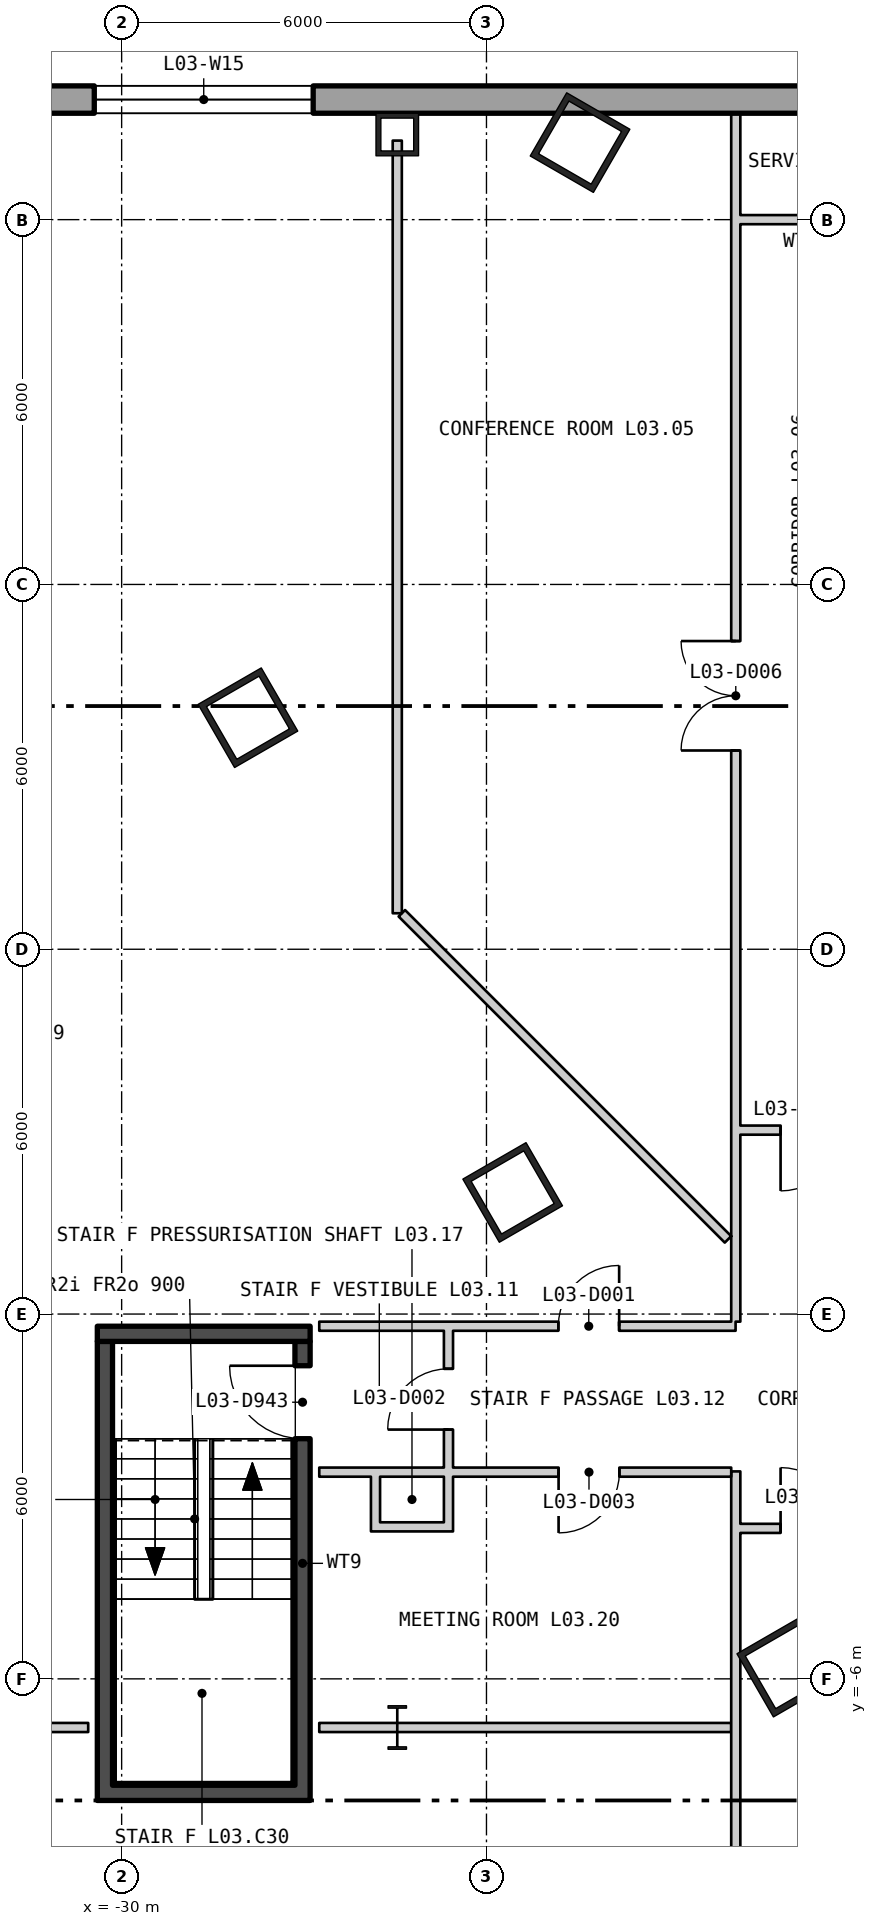
"""IFC4 building model, lengths in metres.
Left out: names, types, materials, properties, quantities, classifications, styles, units other than length and angle.
Written with IfcOpenShell. Run it as: python <this file> out.ifc"""

import sys

from ifc_helpers import new_model, si_unit, direction, frame, frame_2d, origin, origin_2d, place, context, subcontext, project, spatial, polyline, rectangle, hollow_rectangle, i_section, outline, extrude, element, fill, save


model = new_model("IFC4")
c1 = context("Model", 3, precision=1e-05, world=origin(), true_north=direction((0.0, 1.0)))
c2 = subcontext(c1, "Body", "Model", "MODEL_VIEW")
j1 = project(units=[si_unit("LENGTHUNIT", "METRE"), si_unit("PLANEANGLEUNIT", "RADIAN")], contexts=[c1])
p1 = place(None, origin())
s1 = spatial("IfcSite", under=j1, at=p1, CompositionType="ELEMENT")
p2 = place(p1, origin())
s2 = spatial("IfcBuilding", under=s1, at=p2, CompositionType="ELEMENT")
p3 = place(p2, frame((0.0, 0.0, 18.6)))
s3 = spatial("IfcBuildingStorey", under=s2, at=p3, CompositionType="ELEMENT", Elevation=18.6)
for number, where, z_axis, x_axis in (
    (1, (-22.461, 19.267, 0.0), (0.0, 0.0, 1.0), (-0.5, -0.866, 0.0)),
    (2, (-27.923, 9.808, 0.0), (0.0, 0.0, 1.0), (0.5, -0.866, 0.0)),
    (3, (-23.569, 2.0, 0.0), (0.0, 0.0, 1.0), (0.5, -0.866, 0.0)),
    (4, (-19.061, -5.807, 0.0), (0.0, 0.0, 1.0), (0.5, -0.866, 0.0)),
):
    element("IfcColumn", number, at=place(p3, frame(where, z_axis=z_axis, x_axis=x_axis)), inside=s3, PredefinedType="COLUMN", context=c2, shape_type="SweptSolid", body=[
        extrude(hollow_rectangle(XDim=1.2, YDim=1.2, WallThickness=0.1, at=origin_2d()), origin(), (0.0, 0.0, 1.0), 5.1),
    ])
p4 = place(p3, frame((-25.467, 19.4, 0.0), z_axis=(0.0, 0.0, 1.0), x_axis=(-1.0, 0.0, 0.0)))
e5 = element("IfcColumn", 5, at=p4, inside=s3, PredefinedType="COLUMN", context=c2, shape_type="SweptSolid", body=[
    extrude(hollow_rectangle(XDim=0.7, YDim=0.7, WallThickness=0.08, at=origin_2d()), origin(), (0.0, 0.0, 1.0), 5.1),
])
p5 = place(p3, frame((-25.467, -6.8, 0.0), z_axis=(0.0, 0.0, 1.0), x_axis=(1.0, 0.0, 0.0)))
e6 = element("IfcColumn", 6, at=p5, inside=s3, PredefinedType="COLUMN", context=c2, shape_type="SweptSolid", body=[
    extrude(i_section(OverallWidth=0.304, OverallDepth=0.716, WebThickness=0.021, FlangeThickness=0.04, at=origin_2d()), origin(), (0.0, 0.0, 1.0), 5.1),
])
p6 = place(p3, frame((38.775, 19.975, -0.4), z_axis=(0.0, 0.0, 1.0), x_axis=(-1.0, 0.0, 0.0)))
e7 = element("IfcWall", 7, at=p6, inside=s3, PredefinedType="SOLIDWALL", context=c2, shape_type="SweptSolid", body=[
    extrude(outline(polyline([(-0.225, -0.225), (77.775, -0.225), (77.325, 0.225), (0.225, 0.225), (-0.225, -0.225)])), origin(), (0.0, 0.0, 1.0), 5.1),
])
p7 = place(p6, frame((1.958, 0.0, 1.3)))
e8 = element("IfcOpeningElement", 8, at=p7, cuts=e7, PredefinedType="OPENING", context=c2, shape_type="SweptSolid", body=[
    extrude(rectangle(XDim=3.6, YDim=3.2, at=frame_2d((1.8, 1.6))), frame((0.0, 0.235, 0.0), z_axis=(0.0, -1.0, 0.0), x_axis=(1.0, 0.0, 0.0)), (0.0, 0.0, 1.0), 0.47),
])
p8 = place(p6, frame((8.325, 0.0, 1.3)))
e9 = element("IfcOpeningElement", 9, at=p8, cuts=e7, PredefinedType="OPENING", context=c2, shape_type="SweptSolid", body=[
    extrude(rectangle(XDim=3.6, YDim=3.2, at=frame_2d((1.8, 1.6))), frame((0.0, 0.235, 0.0), z_axis=(0.0, -1.0, 0.0), x_axis=(1.0, 0.0, 0.0)), (0.0, 0.0, 1.0), 0.47),
])
p9 = place(p6, frame((20.952, 0.0, 1.3)))
e10 = element("IfcOpeningElement", 10, at=p9, cuts=e7, PredefinedType="OPENING", context=c2, shape_type="SweptSolid", body=[
    extrude(rectangle(XDim=3.6, YDim=3.2, at=frame_2d((1.8, 1.6))), frame((0.0, 0.235, 0.0), z_axis=(0.0, -1.0, 0.0), x_axis=(1.0, 0.0, 0.0)), (0.0, 0.0, 1.0), 0.47),
])
p10 = place(p6, frame((27.425, 0.0, 1.3)))
e11 = element("IfcOpeningElement", 11, at=p10, cuts=e7, PredefinedType="OPENING", context=c2, shape_type="SweptSolid", body=[
    extrude(rectangle(XDim=3.6, YDim=3.2, at=frame_2d((1.8, 1.6))), frame((0.0, 0.235, 0.0), z_axis=(0.0, -1.0, 0.0), x_axis=(1.0, 0.0, 0.0)), (0.0, 0.0, 1.0), 0.47),
])
p11 = place(p6, frame((46.525, 0.0, 1.3)))
e12 = element("IfcOpeningElement", 12, at=p11, cuts=e7, PredefinedType="OPENING", context=c2, shape_type="SweptSolid", body=[
    extrude(rectangle(XDim=3.6, YDim=3.2, at=frame_2d((1.8, 1.6))), frame((0.0, 0.235, 0.0), z_axis=(0.0, -1.0, 0.0), x_axis=(1.0, 0.0, 0.0)), (0.0, 0.0, 1.0), 0.47),
])
p12 = place(p6, frame((52.998, 0.0, 1.3)))
e13 = element("IfcOpeningElement", 13, at=p12, cuts=e7, PredefinedType="OPENING", context=c2, shape_type="SweptSolid", body=[
    extrude(rectangle(XDim=3.6, YDim=3.2, at=frame_2d((1.8, 1.6))), frame((0.0, 0.235, 0.0), z_axis=(0.0, -1.0, 0.0), x_axis=(1.0, 0.0, 0.0)), (0.0, 0.0, 1.0), 0.47),
])
p13 = place(p6, frame((65.625, 0.0, 1.3)))
e14 = element("IfcOpeningElement", 14, at=p13, cuts=e7, PredefinedType="OPENING", context=c2, shape_type="SweptSolid", body=[
    extrude(rectangle(XDim=3.6, YDim=3.2, at=frame_2d((1.8, 1.6))), frame((0.0, 0.235, 0.0), z_axis=(0.0, -1.0, 0.0), x_axis=(1.0, 0.0, 0.0)), (0.0, 0.0, 1.0), 0.47),
])
p14 = place(p6, frame((71.992, 0.0, 1.3)))
e15 = element("IfcOpeningElement", 15, at=p14, cuts=e7, PredefinedType="OPENING", context=c2, shape_type="SweptSolid", body=[
    extrude(rectangle(XDim=3.6, YDim=3.2, at=frame_2d((1.8, 1.6))), frame((0.0, 0.235, 0.0), z_axis=(0.0, -1.0, 0.0), x_axis=(1.0, 0.0, 0.0)), (0.0, 0.0, 1.0), 0.47),
])
p15 = place(p3, frame((-30.275, -7.75, 0.0), z_axis=(0.0, 0.0, 1.0), x_axis=(0.0, 1.0, 0.0)))
e16 = element("IfcWall", 16, at=p15, inside=s3, PredefinedType="SHEAR", context=c2, shape_type="SweptSolid", body=[
    extrude(rectangle(XDim=7.3, YDim=0.25, at=frame_2d((3.65, 0.0))), origin(), (0.0, 0.0, 1.0), 4.88),
])
p16 = place(p3, frame((-27.025, -7.75, 0.0), z_axis=(0.0, 0.0, 1.0), x_axis=(0.0, 1.0, 0.0)))
e17 = element("IfcWall", 17, at=p16, inside=s3, PredefinedType="SHEAR", context=c2, shape_type="SweptSolid", body=[
    extrude(rectangle(XDim=7.3, YDim=0.25, at=frame_2d((3.65, 0.0))), origin(), (0.0, 0.0, 1.0), 4.88),
])
p17 = place(p16, frame((5.7, 0.0, 0.0)))
e18 = element("IfcOpeningElement", 18, at=p17, cuts=e17, PredefinedType="OPENING", context=c2, shape_type="SweptSolid", body=[
    extrude(rectangle(XDim=1.2, YDim=2.1, at=frame_2d((0.6, 1.05))), frame((0.0, 0.135, 0.0), z_axis=(0.0, -1.0, 0.0), x_axis=(1.0, 0.0, 0.0)), (0.0, 0.0, 1.0), 0.27),
])
for number, where, z_axis, x_axis in (
    (19, (-30.4, -7.875, 0.0), (0.0, 0.0, 1.0), (1.0, 0.0, 0.0)),
    (20, (-30.4, -0.325, 0.0), (0.0, 0.0, 1.0), (1.0, 0.0, 0.0)),
):
    element("IfcWall", number, at=place(p3, frame(where, z_axis=z_axis, x_axis=x_axis)), inside=s3, PredefinedType="SHEAR", context=c2, shape_type="SweptSolid", body=[
        extrude(rectangle(XDim=3.5, YDim=0.25, at=frame_2d((1.75, 0.0))), origin(), (0.0, 0.0, 1.0), 4.88),
    ])
p18 = place(p3, frame((-38.1, -6.8, 0.0), z_axis=(0.0, 0.0, 1.0), x_axis=(1.0, 0.0, 0.0)))
e21 = element("IfcWall", 21, at=p18, inside=s3, PredefinedType="PARTITIONING", context=c2, shape_type="SweptSolid", body=[
    extrude(rectangle(XDim=7.55, YDim=0.15, at=frame_2d((3.775, 0.0))), origin(), (0.0, 0.0, 1.0), 4.09),
])
p19 = place(p3, frame((-26.75, -6.8, 0.0), z_axis=(0.0, 0.0, 1.0), x_axis=(1.0, 0.0, 0.0)))
e22 = element("IfcWall", 22, at=p19, inside=s3, PredefinedType="PARTITIONING", context=c2, shape_type="SweptSolid", body=[
    extrude(rectangle(XDim=6.775, YDim=0.15, at=frame_2d((3.388, 0.0))), origin(), (0.0, 0.0, 1.0), 4.09),
])
p20 = place(p3, frame((-26.75, -2.6, 0.0), z_axis=(0.0, 0.0, 1.0), x_axis=(1.0, 0.0, 0.0)))
e23 = element("IfcWall", 23, at=p20, inside=s3, PredefinedType="PARTITIONING", context=c2, shape_type="SweptSolid", body=[
    extrude(rectangle(XDim=0.913, YDim=0.15, at=frame_2d((0.457, 0.0))), origin(), (0.0, 0.0, 1.0), 4.88),
])
p21 = place(p3, frame((-26.75, -0.2, 0.0), z_axis=(0.0, 0.0, 1.0), x_axis=(1.0, 0.0, 0.0)))
e24 = element("IfcWall", 24, at=p21, inside=s3, PredefinedType="PARTITIONING", context=c2, shape_type="SweptSolid", body=[
    extrude(rectangle(XDim=6.847, YDim=0.15, at=frame_2d((3.424, 0.0))), origin(), (0.0, 0.0, 1.0), 4.88),
])
p22 = place(p21, frame((3.932, 0.0, 0.0)))
e25 = element("IfcOpeningElement", 25, at=p22, cuts=e24, PredefinedType="OPENING", context=c2, shape_type="SweptSolid", body=[
    extrude(rectangle(XDim=1.0, YDim=2.1, at=frame_2d((0.5, 1.05))), frame((0.0, 0.085, 0.0), z_axis=(0.0, -1.0, 0.0), x_axis=(1.0, 0.0, 0.0)), (0.0, 0.0, 1.0), 0.17),
])
p23 = place(p3, frame((-25.9, -3.5, 0.0), z_axis=(0.0, 0.0, 1.0), x_axis=(1.0, 0.0, 0.0)))
e26 = element("IfcWall", 26, at=p23, inside=s3, PredefinedType="PARTITIONING", context=c2, shape_type="SweptSolid", body=[
    extrude(rectangle(XDim=1.35, YDim=0.15, at=frame_2d((0.675, 0.0))), origin(), (0.0, 0.0, 1.0), 4.88),
])
p24 = place(p3, frame((-25.837, -2.6, 0.0), z_axis=(0.0, 0.0, 1.0), x_axis=(1.0, 0.0, 0.0)))
e27 = element("IfcWall", 27, at=p24, inside=s3, PredefinedType="PARTITIONING", context=c2, shape_type="SweptSolid", body=[
    extrude(rectangle(XDim=1.287, YDim=0.15, at=frame_2d((0.643, 0.0))), origin(), (0.0, 0.0, 1.0), 4.88),
])
p25 = place(p3, frame((-25.825, -3.425, 0.0), z_axis=(0.0, 0.0, 1.0), x_axis=(0.0, 1.0, 0.0)))
e28 = element("IfcWall", 28, at=p25, inside=s3, PredefinedType="PARTITIONING", context=c2, shape_type="SweptSolid", body=[
    extrude(rectangle(XDim=0.75, YDim=0.15, at=frame_2d((0.375, 0.0))), origin(), (0.0, 0.0, 1.0), 4.88),
])
p26 = place(p3, frame((-25.467, 6.592, 0.0), z_axis=(0.0, 0.0, 1.0), x_axis=(0.0, 1.0, 0.0)))
e29 = element("IfcWall", 29, at=p26, inside=s3, PredefinedType="PARTITIONING", context=c2, shape_type="SweptSolid", body=[
    extrude(rectangle(XDim=7.736, YDim=0.15, at=frame_2d((3.868, 0.0))), origin(), (0.0, 0.0, 1.0), 4.88),
])
p27 = place(p3, frame((-25.467, 14.328, 0.0), z_axis=(0.0, 0.0, 1.0), x_axis=(0.0, 1.0, 0.0)))
e30 = element("IfcWall", 30, at=p27, inside=s3, PredefinedType="PARTITIONING", context=c2, shape_type="SweptSolid", body=[
    extrude(rectangle(XDim=4.972, YDim=0.15, at=frame_2d((2.486, 0.0))), origin(), (0.0, 0.0, 1.0), 4.28),
])
p28 = place(p3, frame((-25.392, 6.592, 0.0), z_axis=(0.0, 0.0, 1.0), x_axis=(0.707106781187, -0.707106781187, 0.0)))
e31 = element("IfcWall", 31, at=p28, inside=s3, PredefinedType="PARTITIONING", context=c2, shape_type="SweptSolid", body=[
    extrude(rectangle(XDim=7.586, YDim=0.15, at=frame_2d((3.793, 0.0))), origin(), (0.0, 0.0, 1.0), 4.88),
])
p29 = place(p3, frame((-24.625, -3.425, 0.0), z_axis=(0.0, 0.0, 1.0), x_axis=(0.0, 1.0, 0.0)))
e32 = element("IfcWall", 32, at=p29, inside=s3, PredefinedType="PARTITIONING", context=c2, shape_type="SweptSolid", body=[
    extrude(rectangle(XDim=0.75, YDim=0.15, at=frame_2d((0.375, 0.0))), origin(), (0.0, 0.0, 1.0), 4.88),
])
p30 = place(p3, frame((-24.625, -2.525, 0.0), z_axis=(0.0, 0.0, 1.0), x_axis=(0.0, 1.0, 0.0)))
e33 = element("IfcWall", 33, at=p30, inside=s3, PredefinedType="PARTITIONING", context=c2, shape_type="SweptSolid", body=[
    extrude(rectangle(XDim=2.25, YDim=0.15, at=frame_2d((1.125, 0.0))), origin(), (0.0, 0.0, 1.0), 4.88),
])
p31 = place(p30, frame((0.625, 0.0, 0.0)))
e34 = element("IfcOpeningElement", 34, at=p31, cuts=e33, PredefinedType="OPENING", context=c2, shape_type="SweptSolid", body=[
    extrude(rectangle(XDim=1.0, YDim=2.1, at=frame_2d((0.5, 1.05))), frame((0.0, 0.085, 0.0), z_axis=(0.0, -1.0, 0.0), x_axis=(1.0, 0.0, 0.0)), (0.0, 0.0, 1.0), 0.17),
])
p32 = place(p3, frame((-24.55, -2.6, 0.0), z_axis=(0.0, 0.0, 1.0), x_axis=(1.0, 0.0, 0.0)))
e35 = element("IfcWall", 35, at=p32, inside=s3, PredefinedType="PARTITIONING", context=c2, shape_type="SweptSolid", body=[
    extrude(rectangle(XDim=4.575, YDim=0.15, at=frame_2d((2.288, 0.0))), origin(), (0.0, 0.0, 1.0), 4.88),
])
p33 = place(p32, frame((1.736, 0.0, 0.0)))
e36 = element("IfcOpeningElement", 36, at=p33, cuts=e35, PredefinedType="OPENING", context=c2, shape_type="SweptSolid", body=[
    extrude(rectangle(XDim=1.0, YDim=2.1, at=frame_2d((0.5, 1.05))), frame((0.0, 0.085, 0.0), z_axis=(0.0, -1.0, 0.0), x_axis=(1.0, 0.0, 0.0)), (0.0, 0.0, 1.0), 0.17),
])
p34 = place(p3, frame((-19.975, 18.0, 0.0), z_axis=(0.0, 0.0, 1.0), x_axis=(1.0, 0.0, 0.0)))
e37 = element("IfcWall", 37, at=p34, inside=s3, PredefinedType="PARTITIONING", context=c2, shape_type="SweptSolid", body=[
    extrude(rectangle(XDim=2.475, YDim=0.15, at=frame_2d((1.238, 0.0))), origin(), (0.0, 0.0, 1.0), 4.33),
])
p35 = place(p3, frame((-19.9, -23.775, 0.0), z_axis=(0.0, 0.0, 1.0), x_axis=(0.0, 1.0, 0.0)))
e38 = element("IfcWall", 38, at=p35, inside=s3, PredefinedType="PARTITIONING", context=c2, shape_type="SweptSolid", body=[
    extrude(rectangle(XDim=21.187, YDim=0.15, at=frame_2d((10.594, 0.0))), origin(), (0.0, 0.0, 1.0), 4.88),
])
p36 = place(p35, frame((3.922, 0.0, 0.0)))
e39 = element("IfcOpeningElement", 39, at=p36, cuts=e38, PredefinedType="OPENING", context=c2, shape_type="SweptSolid", body=[
    extrude(rectangle(XDim=1.0, YDim=2.1, at=frame_2d((0.5, 1.05))), frame((0.0, 0.085, 0.0), z_axis=(0.0, -1.0, 0.0), x_axis=(1.0, 0.0, 0.0)), (0.0, 0.0, 1.0), 0.17),
])
p37 = place(p35, frame((12.423, 0.0, 0.0)))
e40 = element("IfcOpeningElement", 40, at=p37, cuts=e38, PredefinedType="OPENING", context=c2, shape_type="SweptSolid", body=[
    extrude(rectangle(XDim=1.0, YDim=2.1, at=frame_2d((0.5, 1.05))), frame((0.0, 0.085, 0.0), z_axis=(0.0, -1.0, 0.0), x_axis=(1.0, 0.0, 0.0)), (0.0, 0.0, 1.0), 0.17),
])
p38 = place(p3, frame((-19.9, -0.125, 0.0), z_axis=(0.0, 0.0, 1.0), x_axis=(0.0, 1.0, 0.0)))
e41 = element("IfcWall", 41, at=p38, inside=s3, PredefinedType="PARTITIONING", context=c2, shape_type="SweptSolid", body=[
    extrude(rectangle(XDim=1.15, YDim=0.15, at=frame_2d((0.575, 0.0))), origin(), (0.0, 0.0, 1.0), 4.88),
])
p39 = place(p3, frame((-19.9, 1.025, 0.0), z_axis=(0.0, 0.0, 1.0), x_axis=(0.0, 1.0, 0.0)))
e42 = element("IfcWall", 42, at=p39, inside=s3, PredefinedType="PARTITIONING", context=c2, shape_type="SweptSolid", body=[
    extrude(rectangle(XDim=16.9, YDim=0.15, at=frame_2d((8.45, 0.0))), origin(), (0.0, 0.0, 1.0), 4.88),
])
p40 = place(p39, frame((8.244, 0.0, 0.0)))
e43 = element("IfcOpeningElement", 43, at=p40, cuts=e42, PredefinedType="OPENING", context=c2, shape_type="SweptSolid", body=[
    extrude(rectangle(XDim=1.8, YDim=2.1, at=frame_2d((0.9, 1.05))), frame((0.0, 0.085, 0.0), z_axis=(0.0, -1.0, 0.0), x_axis=(1.0, 0.0, 0.0)), (0.0, 0.0, 1.0), 0.17),
])
p41 = place(p3, frame((-19.9, 18.075, 0.0), z_axis=(0.0, 0.0, 1.0), x_axis=(0.0, 1.0, 0.0)))
e44 = element("IfcWall", 44, at=p41, inside=s3, PredefinedType="PARTITIONING", context=c2, shape_type="SweptSolid", body=[
    extrude(rectangle(XDim=1.675, YDim=0.15, at=frame_2d((0.838, 0.0))), origin(), (0.0, 0.0, 1.0), 4.88),
])
p42 = place(p3, frame((-19.825, -3.525, 0.0), z_axis=(0.0, 0.0, 1.0), x_axis=(1.0, 0.0, 0.0)))
e45 = element("IfcWall", 45, at=p42, inside=s3, PredefinedType="PARTITIONING", context=c2, shape_type="SweptSolid", body=[
    extrude(rectangle(XDim=2.325, YDim=0.15, at=frame_2d((1.163, 0.0))), origin(), (0.0, 0.0, 1.0), 4.88),
])
p43 = place(p42, frame((0.662, 0.0, 0.0)))
e46 = element("IfcOpeningElement", 46, at=p43, cuts=e45, PredefinedType="OPENING", context=c2, shape_type="SweptSolid", body=[
    extrude(rectangle(XDim=1.0, YDim=2.1, at=frame_2d((0.5, 1.05))), frame((0.0, 0.085, 0.0), z_axis=(0.0, -1.0, 0.0), x_axis=(1.0, 0.0, 0.0)), (0.0, 0.0, 1.0), 0.17),
])
p44 = place(p3, frame((-19.825, 3.025, 0.0), z_axis=(0.0, 0.0, 1.0), x_axis=(1.0, 0.0, 0.0)))
e47 = element("IfcWall", 47, at=p44, inside=s3, PredefinedType="PARTITIONING", context=c2, shape_type="SweptSolid", body=[
    extrude(rectangle(XDim=2.325, YDim=0.15, at=frame_2d((1.163, 0.0))), origin(), (0.0, 0.0, 1.0), 4.33),
])
p45 = place(p44, frame((0.662, 0.0, 0.0)))
e48 = element("IfcOpeningElement", 48, at=p45, cuts=e47, PredefinedType="OPENING", context=c2, shape_type="SweptSolid", body=[
    extrude(rectangle(XDim=1.0, YDim=2.1, at=frame_2d((0.5, 1.05))), frame((0.0, 0.085, 0.0), z_axis=(0.0, -1.0, 0.0), x_axis=(1.0, 0.0, 0.0)), (0.0, 0.0, 1.0), 0.17),
])
p46 = place(p13, origin())
e49 = element("IfcWindow", 49, at=p46, inside=s3, PartitioningType="SINGLE_PANEL", PredefinedType="WINDOW", context=c2, shape_type="SweptSolid", body=[
    extrude(rectangle(XDim=3.6, YDim=3.2, at=frame_2d((1.8, 1.6))), frame((0.0, 0.105, 0.0), z_axis=(0.0, -1.0, 0.0), x_axis=(1.0, 0.0, 0.0)), (0.0, 0.0, 1.0), 0.06),
])
fill(e14, e49)
p47 = place(p17, origin())
e50 = element("IfcDoor", 50, at=p47, inside=s3, OperationType="SINGLE_SWING_LEFT", PredefinedType="DOOR", context=c2, shape_type="SweptSolid", body=[
    extrude(rectangle(XDim=1.2, YDim=2.1, at=frame_2d((0.6, 1.05))), frame((0.0, 0.025, 0.0), z_axis=(0.0, -1.0, 0.0), x_axis=(1.0, 0.0, 0.0)), (0.0, 0.0, 1.0), 0.05),
])
fill(e18, e50)
p48 = place(p22, origin())
e51 = element("IfcDoor", 51, at=p48, inside=s3, OperationType="SINGLE_SWING_LEFT", PredefinedType="DOOR", context=c2, shape_type="SweptSolid", body=[
    extrude(rectangle(XDim=1.0, YDim=2.1, at=frame_2d((0.5, 1.05))), frame((0.0, 0.025, 0.0), z_axis=(0.0, -1.0, 0.0), x_axis=(1.0, 0.0, 0.0)), (0.0, 0.0, 1.0), 0.05),
])
fill(e25, e51)
p49 = place(p31, origin())
e52 = element("IfcDoor", 52, at=p49, inside=s3, OperationType="SINGLE_SWING_RIGHT", PredefinedType="DOOR", context=c2, shape_type="SweptSolid", body=[
    extrude(rectangle(XDim=1.0, YDim=2.1, at=frame_2d((0.5, 1.05))), frame((0.0, 0.025, 0.0), z_axis=(0.0, -1.0, 0.0), x_axis=(1.0, 0.0, 0.0)), (0.0, 0.0, 1.0), 0.05),
])
fill(e34, e52)
p50 = place(p33, origin())
e53 = element("IfcDoor", 53, at=p50, inside=s3, OperationType="SINGLE_SWING_LEFT", PredefinedType="DOOR", context=c2, shape_type="SweptSolid", body=[
    extrude(rectangle(XDim=1.0, YDim=2.1, at=frame_2d((0.5, 1.05))), frame((0.0, 0.025, 0.0), z_axis=(0.0, -1.0, 0.0), x_axis=(1.0, 0.0, 0.0)), (0.0, 0.0, 1.0), 0.05),
])
fill(e36, e53)
p51 = place(p40, origin())
e54 = element("IfcDoor", 54, at=p51, inside=s3, OperationType="DOUBLE_DOOR_SINGLE_SWING", PredefinedType="DOOR", context=c2, shape_type="SweptSolid", body=[
    extrude(rectangle(XDim=1.8, YDim=2.1, at=frame_2d((0.9, 1.05))), frame((0.0, 0.025, 0.0), z_axis=(0.0, -1.0, 0.0), x_axis=(1.0, 0.0, 0.0)), (0.0, 0.0, 1.0), 0.05),
])
fill(e43, e54)
p52 = place(p43, origin())
e55 = element("IfcDoor", 55, at=p52, inside=s3, OperationType="SINGLE_SWING_RIGHT", PredefinedType="DOOR", context=c2, shape_type="SweptSolid", body=[
    extrude(rectangle(XDim=1.0, YDim=2.1, at=frame_2d((0.5, 1.05))), frame((0.0, 0.025, 0.0), z_axis=(0.0, -1.0, 0.0), x_axis=(1.0, 0.0, 0.0)), (0.0, 0.0, 1.0), 0.05),
])
fill(e46, e55)
p53 = place(p45, origin())
e56 = element("IfcDoor", 56, at=p53, inside=s3, OperationType="SINGLE_SWING_LEFT", PredefinedType="DOOR", context=c2, shape_type="SweptSolid", body=[
    extrude(rectangle(XDim=1.0, YDim=2.1, at=frame_2d((0.5, 1.05))), frame((0.0, 0.025, 0.0), z_axis=(0.0, -1.0, 0.0), x_axis=(1.0, 0.0, 0.0)), (0.0, 0.0, 1.0), 0.05),
])
fill(e48, e56)
save(model, sys.argv[1])
